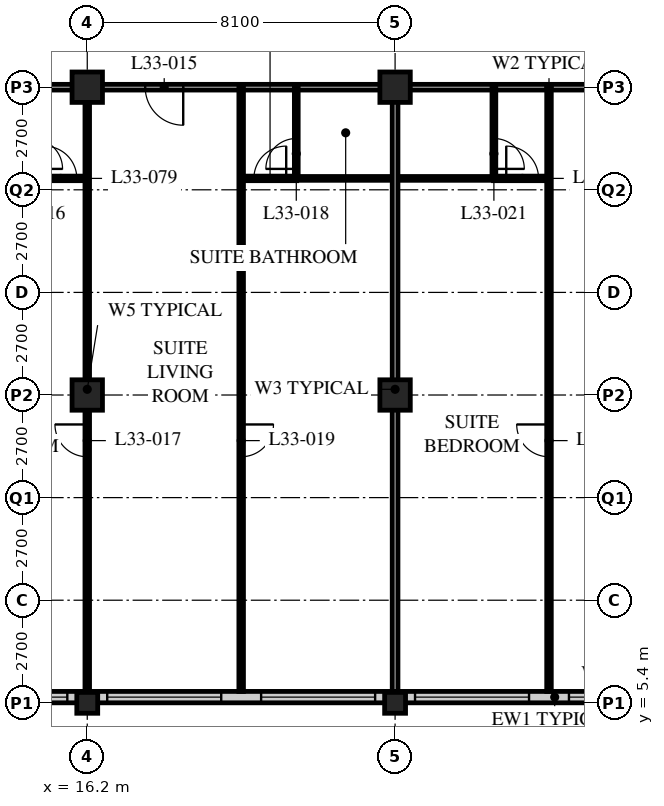
"""IFC4 building model, lengths in metres.
Left out: names, types, materials, properties, quantities, classifications, styles, units other than length and angle.
Written with IfcOpenShell. Run it as: python <this file> out.ifc"""

import sys

from ifc_helpers import new_model, si_unit, direction, frame, frame_2d, origin, origin_2d, place, context, subcontext, project, spatial, rectangle, hollow_rectangle, extrude, element, fill, save


model = new_model("IFC4")
c1 = context("Model", 3, precision=1e-05, world=origin(), true_north=direction((0.0, 1.0)))
c2 = subcontext(c1, "Body", "Model", "MODEL_VIEW")
j1 = project(units=[si_unit("LENGTHUNIT", "METRE"), si_unit("PLANEANGLEUNIT", "RADIAN")], contexts=[c1])
p1 = place(None, origin())
s1 = spatial("IfcSite", under=j1, at=p1, CompositionType="ELEMENT")
p2 = place(p1, origin())
s2 = spatial("IfcBuilding", under=s1, at=p2, CompositionType="ELEMENT")
p3 = place(p2, frame((0.0, 0.0, 130.6)))
s3 = spatial("IfcBuildingStorey", under=s2, at=p3, CompositionType="ELEMENT", Elevation=130.6)
p4 = place(p3, frame((16.2, 5.4, 0.0), z_axis=(0.0, 0.0, 1.0), x_axis=(1.0, 0.0, 0.0)))
e1 = element("IfcColumn", 1, at=p4, inside=s3, PredefinedType="COLUMN", context=c2, shape_type="SweptSolid", body=[
    extrude(hollow_rectangle(XDim=0.55, YDim=0.55, WallThickness=0.04, at=origin_2d()), origin(), (0.0, 0.0, 1.0), 3.4),
])
for number, where, z_axis, x_axis in (
    (2, (16.2, 13.5, 0.0), (0.0, 0.0, 1.0), (1.0, 0.0, 0.0)),
    (3, (16.2, 21.6, 0.0), (0.0, 0.0, 1.0), (1.0, 0.0, 0.0)),
):
    element("IfcColumn", number, at=place(p3, frame(where, z_axis=z_axis, x_axis=x_axis)), inside=s3, PredefinedType="COLUMN", context=c2, shape_type="SweptSolid", body=[
        extrude(hollow_rectangle(XDim=0.8, YDim=0.8, WallThickness=0.08, at=origin_2d()), origin(), (0.0, 0.0, 1.0), 3.4),
    ])
p5 = place(p3, frame((24.3, 5.4, 0.0), z_axis=(0.0, 0.0, 1.0), x_axis=(1.0, 0.0, 0.0)))
e4 = element("IfcColumn", 4, at=p5, inside=s3, PredefinedType="COLUMN", context=c2, shape_type="SweptSolid", body=[
    extrude(hollow_rectangle(XDim=0.55, YDim=0.55, WallThickness=0.04, at=origin_2d()), origin(), (0.0, 0.0, 1.0), 3.4),
])
for number, where, z_axis, x_axis in (
    (5, (24.3, 13.5, 0.0), (0.0, 0.0, 1.0), (1.0, 0.0, 0.0)),
    (6, (24.3, 21.6, 0.0), (0.0, 0.0, 1.0), (1.0, 0.0, 0.0)),
):
    element("IfcColumn", number, at=place(p3, frame(where, z_axis=z_axis, x_axis=x_axis)), inside=s3, PredefinedType="COLUMN", context=c2, shape_type="SweptSolid", body=[
        extrude(hollow_rectangle(XDim=0.8, YDim=0.8, WallThickness=0.08, at=origin_2d()), origin(), (0.0, 0.0, 1.0), 3.4),
    ])
p6 = place(p3, frame((8.4, 5.55, 0.0), z_axis=(0.0, 0.0, 1.0), x_axis=(1.0, 0.0, 0.0)))
e7 = element("IfcWall", 7, at=p6, inside=s3, PredefinedType="SOLIDWALL", context=c2, shape_type="SweptSolid", body=[
    extrude(rectangle(XDim=40.2, YDim=0.3, at=frame_2d((20.1, 0.0))), origin(), (0.0, 0.0, 1.0), 3.19),
])
p7 = place(p6, frame((0.225, 0.0, 0.9)))
e8 = element("IfcOpeningElement", 8, at=p7, cuts=e7, PredefinedType="OPENING", context=c2, shape_type="SweptSolid", body=[
    extrude(rectangle(XDim=3.0, YDim=2.0, at=frame_2d((1.5, 1.0))), frame((0.0, 0.16, 0.0), z_axis=(0.0, -1.0, 0.0), x_axis=(1.0, 0.0, 0.0)), (0.0, 0.0, 1.0), 0.32),
])
p8 = place(p6, frame((4.275, 0.0, 0.9)))
e9 = element("IfcOpeningElement", 9, at=p8, cuts=e7, PredefinedType="OPENING", context=c2, shape_type="SweptSolid", body=[
    extrude(rectangle(XDim=3.0, YDim=2.0, at=frame_2d((1.5, 1.0))), frame((0.0, 0.16, 0.0), z_axis=(0.0, -1.0, 0.0), x_axis=(1.0, 0.0, 0.0)), (0.0, 0.0, 1.0), 0.32),
])
p9 = place(p6, frame((8.325, 0.0, 0.9)))
e10 = element("IfcOpeningElement", 10, at=p9, cuts=e7, PredefinedType="OPENING", context=c2, shape_type="SweptSolid", body=[
    extrude(rectangle(XDim=3.0, YDim=2.0, at=frame_2d((1.5, 1.0))), frame((0.0, 0.16, 0.0), z_axis=(0.0, -1.0, 0.0), x_axis=(1.0, 0.0, 0.0)), (0.0, 0.0, 1.0), 0.32),
])
p10 = place(p6, frame((12.375, 0.0, 0.9)))
e11 = element("IfcOpeningElement", 11, at=p10, cuts=e7, PredefinedType="OPENING", context=c2, shape_type="SweptSolid", body=[
    extrude(rectangle(XDim=3.0, YDim=2.0, at=frame_2d((1.5, 1.0))), frame((0.0, 0.16, 0.0), z_axis=(0.0, -1.0, 0.0), x_axis=(1.0, 0.0, 0.0)), (0.0, 0.0, 1.0), 0.32),
])
p11 = place(p6, frame((16.425, 0.0, 0.9)))
e12 = element("IfcOpeningElement", 12, at=p11, cuts=e7, PredefinedType="OPENING", context=c2, shape_type="SweptSolid", body=[
    extrude(rectangle(XDim=3.0, YDim=2.0, at=frame_2d((1.5, 1.0))), frame((0.0, 0.16, 0.0), z_axis=(0.0, -1.0, 0.0), x_axis=(1.0, 0.0, 0.0)), (0.0, 0.0, 1.0), 0.32),
])
p12 = place(p6, frame((20.475, 0.0, 0.9)))
e13 = element("IfcOpeningElement", 13, at=p12, cuts=e7, PredefinedType="OPENING", context=c2, shape_type="SweptSolid", body=[
    extrude(rectangle(XDim=3.0, YDim=2.0, at=frame_2d((1.5, 1.0))), frame((0.0, 0.16, 0.0), z_axis=(0.0, -1.0, 0.0), x_axis=(1.0, 0.0, 0.0)), (0.0, 0.0, 1.0), 0.32),
])
p13 = place(p6, frame((24.525, 0.0, 0.9)))
e14 = element("IfcOpeningElement", 14, at=p13, cuts=e7, PredefinedType="OPENING", context=c2, shape_type="SweptSolid", body=[
    extrude(rectangle(XDim=3.0, YDim=2.0, at=frame_2d((1.5, 1.0))), frame((0.0, 0.16, 0.0), z_axis=(0.0, -1.0, 0.0), x_axis=(1.0, 0.0, 0.0)), (0.0, 0.0, 1.0), 0.32),
])
p14 = place(p6, frame((28.575, 0.0, 0.9)))
e15 = element("IfcOpeningElement", 15, at=p14, cuts=e7, PredefinedType="OPENING", context=c2, shape_type="SweptSolid", body=[
    extrude(rectangle(XDim=3.0, YDim=2.0, at=frame_2d((1.5, 1.0))), frame((0.0, 0.16, 0.0), z_axis=(0.0, -1.0, 0.0), x_axis=(1.0, 0.0, 0.0)), (0.0, 0.0, 1.0), 0.32),
])
p15 = place(p6, frame((32.625, 0.0, 0.9)))
e16 = element("IfcOpeningElement", 16, at=p15, cuts=e7, PredefinedType="OPENING", context=c2, shape_type="SweptSolid", body=[
    extrude(rectangle(XDim=3.0, YDim=2.0, at=frame_2d((1.5, 1.0))), frame((0.0, 0.16, 0.0), z_axis=(0.0, -1.0, 0.0), x_axis=(1.0, 0.0, 0.0)), (0.0, 0.0, 1.0), 0.32),
])
p16 = place(p6, frame((36.675, 0.0, 0.9)))
e17 = element("IfcOpeningElement", 17, at=p16, cuts=e7, PredefinedType="OPENING", context=c2, shape_type="SweptSolid", body=[
    extrude(rectangle(XDim=3.0, YDim=2.0, at=frame_2d((1.5, 1.0))), frame((0.0, 0.16, 0.0), z_axis=(0.0, -1.0, 0.0), x_axis=(1.0, 0.0, 0.0)), (0.0, 0.0, 1.0), 0.32),
])
p17 = place(p3, frame((8.1, 21.6, 0.0), z_axis=(0.0, 0.0, 1.0), x_axis=(1.0, 0.0, 0.0)))
e18 = element("IfcWall", 18, at=p17, inside=s3, PredefinedType="PARTITIONING", context=c2, shape_type="SweptSolid", body=[
    extrude(rectangle(XDim=40.5, YDim=0.15, at=frame_2d((20.25, 0.0))), origin(), (0.0, 0.0, 1.0), 2.578),
])
p18 = place(p17, frame((9.625, 0.0, 0.0)))
e19 = element("IfcOpeningElement", 19, at=p18, cuts=e18, PredefinedType="OPENING", context=c2, shape_type="SweptSolid", body=[
    extrude(rectangle(XDim=1.0, YDim=2.1, at=frame_2d((0.5, 1.05))), frame((0.0, 0.085, 0.0), z_axis=(0.0, -1.0, 0.0), x_axis=(1.0, 0.0, 0.0)), (0.0, 0.0, 1.0), 0.17),
])
p19 = place(p17, frame((21.775, 0.0, 0.0)))
e20 = element("IfcOpeningElement", 20, at=p19, cuts=e18, PredefinedType="OPENING", context=c2, shape_type="SweptSolid", body=[
    extrude(rectangle(XDim=1.0, YDim=2.1, at=frame_2d((0.5, 1.05))), frame((0.0, 0.085, 0.0), z_axis=(0.0, -1.0, 0.0), x_axis=(1.0, 0.0, 0.0)), (0.0, 0.0, 1.0), 0.17),
])
p20 = place(p17, frame((28.95, 0.0, 0.0)))
e21 = element("IfcOpeningElement", 21, at=p20, cuts=e18, PredefinedType="OPENING", context=c2, shape_type="SweptSolid", body=[
    extrude(rectangle(XDim=1.0, YDim=2.1, at=frame_2d((0.5, 1.05))), frame((0.0, 0.085, 0.0), z_axis=(0.0, -1.0, 0.0), x_axis=(1.0, 0.0, 0.0)), (0.0, 0.0, 1.0), 0.17),
])
p21 = place(p17, frame((34.85, 0.0, 0.0)))
e22 = element("IfcOpeningElement", 22, at=p21, cuts=e18, PredefinedType="OPENING", context=c2, shape_type="SweptSolid", body=[
    extrude(rectangle(XDim=1.0, YDim=2.1, at=frame_2d((0.5, 1.05))), frame((0.0, 0.085, 0.0), z_axis=(0.0, -1.0, 0.0), x_axis=(1.0, 0.0, 0.0)), (0.0, 0.0, 1.0), 0.17),
])
p22 = place(p17, frame((1.525, 0.0, 0.0)))
e23 = element("IfcOpeningElement", 23, at=p22, cuts=e18, PredefinedType="OPENING", context=c2, shape_type="SweptSolid", body=[
    extrude(rectangle(XDim=1.0, YDim=2.1, at=frame_2d((0.5, 1.05))), frame((0.0, 0.085, 0.0), z_axis=(0.0, -1.0, 0.0), x_axis=(1.0, 0.0, 0.0)), (0.0, 0.0, 1.0), 0.17),
])
p23 = place(p17, frame((37.975, 0.0, 0.0)))
e24 = element("IfcOpeningElement", 24, at=p23, cuts=e18, PredefinedType="OPENING", context=c2, shape_type="SweptSolid", body=[
    extrude(rectangle(XDim=1.0, YDim=2.1, at=frame_2d((0.5, 1.05))), frame((0.0, 0.085, 0.0), z_axis=(0.0, -1.0, 0.0), x_axis=(1.0, 0.0, 0.0)), (0.0, 0.0, 1.0), 0.17),
])
p24 = place(p3, frame((16.2, 21.6, 0.0), z_axis=(0.0, 0.0, 1.0), x_axis=(0.0, -1.0, 0.0)))
e25 = element("IfcWall", 25, at=p24, inside=s3, PredefinedType="PARTITIONING", context=c2, shape_type="SweptSolid", body=[
    extrude(rectangle(XDim=15.9, YDim=0.12, at=frame_2d((7.95, 0.0))), origin(), (0.0, 0.0, 1.0), 2.578),
])
p25 = place(p24, frame((8.875, 0.0, 0.0)))
e26 = element("IfcOpeningElement", 26, at=p25, cuts=e25, PredefinedType="OPENING", context=c2, shape_type="SweptSolid", body=[
    extrude(rectangle(XDim=0.85, YDim=2.1, at=frame_2d((0.425, 1.05))), frame((0.0, 0.07, 0.0), z_axis=(0.0, -1.0, 0.0), x_axis=(1.0, 0.0, 0.0)), (0.0, 0.0, 1.0), 0.14),
])
p26 = place(p3, frame((21.7, 19.2, 0.0), z_axis=(0.0, 0.0, 1.0), x_axis=(1.0, 0.0, 0.0)))
e27 = element("IfcWall", 27, at=p26, inside=s3, PredefinedType="PARTITIONING", context=c2, shape_type="SweptSolid", body=[
    extrude(rectangle(XDim=5.2, YDim=0.1, at=frame_2d((2.6, 0.0))), origin(), (0.0, 0.0, 1.0), 3.19),
])
p27 = place(p3, frame((21.7, 21.6, 0.0), z_axis=(0.0, 0.0, 1.0), x_axis=(0.0, -1.0, 0.0)))
e28 = element("IfcWall", 28, at=p27, inside=s3, PredefinedType="PARTITIONING", context=c2, shape_type="SweptSolid", body=[
    extrude(rectangle(XDim=2.4, YDim=0.1, at=frame_2d((1.2, 0.0))), origin(), (0.0, 0.0, 1.0), 3.19),
])
p28 = place(p27, frame((1.35, 0.0, 0.0)))
e29 = element("IfcOpeningElement", 29, at=p28, cuts=e28, PredefinedType="OPENING", context=c2, shape_type="SweptSolid", body=[
    extrude(rectangle(XDim=0.8, YDim=2.1, at=frame_2d((0.4, 1.05))), frame((0.0, 0.06, 0.0), z_axis=(0.0, -1.0, 0.0), x_axis=(1.0, 0.0, 0.0)), (0.0, 0.0, 1.0), 0.12),
])
p29 = place(p3, frame((20.25, 21.6, 0.0), z_axis=(0.0, 0.0, 1.0), x_axis=(0.0, -1.0, 0.0)))
e30 = element("IfcWall", 30, at=p29, inside=s3, PredefinedType="PARTITIONING", context=c2, shape_type="SweptSolid", body=[
    extrude(rectangle(XDim=15.9, YDim=0.12, at=frame_2d((7.95, 0.0))), origin(), (0.0, 0.0, 1.0), 3.19),
])
p30 = place(p29, frame((8.875, 0.0, 0.0)))
e31 = element("IfcOpeningElement", 31, at=p30, cuts=e30, PredefinedType="OPENING", context=c2, shape_type="SweptSolid", body=[
    extrude(rectangle(XDim=0.85, YDim=2.1, at=frame_2d((0.425, 1.05))), frame((0.0, 0.07, 0.0), z_axis=(0.0, -1.0, 0.0), x_axis=(1.0, 0.0, 0.0)), (0.0, 0.0, 1.0), 0.14),
])
p31 = place(p3, frame((24.3, 21.6, 0.0), z_axis=(0.0, 0.0, 1.0), x_axis=(0.0, -1.0, 0.0)))
e32 = element("IfcWall", 32, at=p31, inside=s3, PredefinedType="PARTITIONING", context=c2, shape_type="SweptSolid", body=[
    extrude(rectangle(XDim=15.9, YDim=0.15, at=frame_2d((7.95, 0.0))), origin(), (0.0, 0.0, 1.0), 2.578),
])
p32 = place(p3, frame((26.9, 21.6, 0.0), z_axis=(0.0, 0.0, 1.0), x_axis=(0.0, -1.0, 0.0)))
e33 = element("IfcWall", 33, at=p32, inside=s3, PredefinedType="PARTITIONING", context=c2, shape_type="SweptSolid", body=[
    extrude(rectangle(XDim=2.4, YDim=0.1, at=frame_2d((1.2, 0.0))), origin(), (0.0, 0.0, 1.0), 3.19),
])
p33 = place(p32, frame((1.35, 0.0, 0.0)))
e34 = element("IfcOpeningElement", 34, at=p33, cuts=e33, PredefinedType="OPENING", context=c2, shape_type="SweptSolid", body=[
    extrude(rectangle(XDim=0.8, YDim=2.1, at=frame_2d((0.4, 1.05))), frame((0.0, 0.06, 0.0), z_axis=(0.0, -1.0, 0.0), x_axis=(1.0, 0.0, 0.0)), (0.0, 0.0, 1.0), 0.12),
])
p34 = place(p3, frame((28.35, 21.6, 0.0), z_axis=(0.0, 0.0, 1.0), x_axis=(0.0, -1.0, 0.0)))
e35 = element("IfcWall", 35, at=p34, inside=s3, PredefinedType="PARTITIONING", context=c2, shape_type="SweptSolid", body=[
    extrude(rectangle(XDim=15.9, YDim=0.12, at=frame_2d((7.95, 0.0))), origin(), (0.0, 0.0, 1.0), 3.19),
])
p35 = place(p34, frame((8.875, 0.0, 0.0)))
e36 = element("IfcOpeningElement", 36, at=p35, cuts=e35, PredefinedType="OPENING", context=c2, shape_type="SweptSolid", body=[
    extrude(rectangle(XDim=0.85, YDim=2.1, at=frame_2d((0.425, 1.05))), frame((0.0, 0.07, 0.0), z_axis=(0.0, -1.0, 0.0), x_axis=(1.0, 0.0, 0.0)), (0.0, 0.0, 1.0), 0.14),
])
p36 = place(p3, frame((16.2, 19.2, 0.0), z_axis=(0.0, 0.0, 1.0), x_axis=(-1.0, 0.0, 0.0)))
e37 = element("IfcWall", 37, at=p36, inside=s3, PredefinedType="PARTITIONING", context=c2, shape_type="SweptSolid", body=[
    extrude(rectangle(XDim=1.46, YDim=0.12, at=frame_2d((0.73, 0.0))), origin(), (0.0, 0.0, 1.0), 3.19),
])
p37 = place(p36, frame((0.275, 0.0, 0.0)))
e38 = element("IfcOpeningElement", 38, at=p37, cuts=e37, PredefinedType="OPENING", context=c2, shape_type="SweptSolid", body=[
    extrude(rectangle(XDim=0.85, YDim=2.1, at=frame_2d((0.425, 1.05))), frame((0.0, 0.07, 0.0), z_axis=(0.0, -1.0, 0.0), x_axis=(1.0, 0.0, 0.0)), (0.0, 0.0, 1.0), 0.14),
])
p38 = place(p3, frame((21.71, 19.2, 0.0), z_axis=(0.0, 0.0, 1.0), x_axis=(-1.0, 0.0, 0.0)))
e39 = element("IfcWall", 39, at=p38, inside=s3, PredefinedType="PARTITIONING", context=c2, shape_type="SweptSolid", body=[
    extrude(rectangle(XDim=1.46, YDim=0.12, at=frame_2d((0.73, 0.0))), origin(), (0.0, 0.0, 1.0), 3.19),
])
p39 = place(p38, frame((0.275, 0.0, 0.0)))
e40 = element("IfcOpeningElement", 40, at=p39, cuts=e39, PredefinedType="OPENING", context=c2, shape_type="SweptSolid", body=[
    extrude(rectangle(XDim=0.85, YDim=2.1, at=frame_2d((0.425, 1.05))), frame((0.0, 0.07, 0.0), z_axis=(0.0, -1.0, 0.0), x_axis=(1.0, 0.0, 0.0)), (0.0, 0.0, 1.0), 0.14),
])
p40 = place(p3, frame((28.35, 19.2, 0.0), z_axis=(0.0, 0.0, 1.0), x_axis=(-1.0, 0.0, 0.0)))
e41 = element("IfcWall", 41, at=p40, inside=s3, PredefinedType="PARTITIONING", context=c2, shape_type="SweptSolid", body=[
    extrude(rectangle(XDim=1.46, YDim=0.12, at=frame_2d((0.73, 0.0))), origin(), (0.0, 0.0, 1.0), 3.19),
])
p41 = place(p40, frame((0.275, 0.0, 0.0)))
e42 = element("IfcOpeningElement", 42, at=p41, cuts=e41, PredefinedType="OPENING", context=c2, shape_type="SweptSolid", body=[
    extrude(rectangle(XDim=0.85, YDim=2.1, at=frame_2d((0.425, 1.05))), frame((0.0, 0.07, 0.0), z_axis=(0.0, -1.0, 0.0), x_axis=(1.0, 0.0, 0.0)), (0.0, 0.0, 1.0), 0.14),
])
p42 = place(p8, origin())
e43 = element("IfcWindow", 43, at=p42, inside=s3, PartitioningType="SINGLE_PANEL", PredefinedType="WINDOW", context=c2, shape_type="SweptSolid", body=[
    extrude(rectangle(XDim=3.0, YDim=2.0, at=frame_2d((1.5, 1.0))), frame((0.0, 0.03, 0.0), z_axis=(0.0, -1.0, 0.0), x_axis=(1.0, 0.0, 0.0)), (0.0, 0.0, 1.0), 0.06),
])
fill(e9, e43)
p43 = place(p9, origin())
e44 = element("IfcWindow", 44, at=p43, inside=s3, PartitioningType="SINGLE_PANEL", PredefinedType="WINDOW", context=c2, shape_type="SweptSolid", body=[
    extrude(rectangle(XDim=3.0, YDim=2.0, at=frame_2d((1.5, 1.0))), frame((0.0, 0.03, 0.0), z_axis=(0.0, -1.0, 0.0), x_axis=(1.0, 0.0, 0.0)), (0.0, 0.0, 1.0), 0.06),
])
fill(e10, e44)
p44 = place(p10, origin())
e45 = element("IfcWindow", 45, at=p44, inside=s3, PartitioningType="SINGLE_PANEL", PredefinedType="WINDOW", context=c2, shape_type="SweptSolid", body=[
    extrude(rectangle(XDim=3.0, YDim=2.0, at=frame_2d((1.5, 1.0))), frame((0.0, 0.03, 0.0), z_axis=(0.0, -1.0, 0.0), x_axis=(1.0, 0.0, 0.0)), (0.0, 0.0, 1.0), 0.06),
])
fill(e11, e45)
p45 = place(p11, origin())
e46 = element("IfcWindow", 46, at=p45, inside=s3, PartitioningType="SINGLE_PANEL", PredefinedType="WINDOW", context=c2, shape_type="SweptSolid", body=[
    extrude(rectangle(XDim=3.0, YDim=2.0, at=frame_2d((1.5, 1.0))), frame((0.0, 0.03, 0.0), z_axis=(0.0, -1.0, 0.0), x_axis=(1.0, 0.0, 0.0)), (0.0, 0.0, 1.0), 0.06),
])
fill(e12, e46)
p46 = place(p12, origin())
e47 = element("IfcWindow", 47, at=p46, inside=s3, PartitioningType="SINGLE_PANEL", PredefinedType="WINDOW", context=c2, shape_type="SweptSolid", body=[
    extrude(rectangle(XDim=3.0, YDim=2.0, at=frame_2d((1.5, 1.0))), frame((0.0, 0.03, 0.0), z_axis=(0.0, -1.0, 0.0), x_axis=(1.0, 0.0, 0.0)), (0.0, 0.0, 1.0), 0.06),
])
fill(e13, e47)
p47 = place(p18, origin())
e48 = element("IfcDoor", 48, at=p47, inside=s3, OperationType="SINGLE_SWING_LEFT", PredefinedType="DOOR", context=c2, shape_type="SweptSolid", body=[
    extrude(rectangle(XDim=1.0, YDim=2.1, at=frame_2d((0.5, 1.05))), frame((0.0, 0.025, 0.0), z_axis=(0.0, -1.0, 0.0), x_axis=(1.0, 0.0, 0.0)), (0.0, 0.0, 1.0), 0.05),
])
fill(e19, e48)
p48 = place(p25, origin())
e49 = element("IfcDoor", 49, at=p48, inside=s3, OperationType="SINGLE_SWING_RIGHT", PredefinedType="DOOR", context=c2, shape_type="SweptSolid", body=[
    extrude(rectangle(XDim=0.85, YDim=2.1, at=frame_2d((0.425, 1.05))), frame((0.0, 0.025, 0.0), z_axis=(0.0, -1.0, 0.0), x_axis=(1.0, 0.0, 0.0)), (0.0, 0.0, 1.0), 0.05),
])
fill(e26, e49)
p49 = place(p28, origin())
e50 = element("IfcDoor", 50, at=p49, inside=s3, OperationType="SINGLE_SWING_LEFT", PredefinedType="DOOR", context=c2, shape_type="SweptSolid", body=[
    extrude(rectangle(XDim=0.8, YDim=2.1, at=frame_2d((0.4, 1.05))), frame((0.0, 0.025, 0.0), z_axis=(0.0, -1.0, 0.0), x_axis=(1.0, 0.0, 0.0)), (0.0, 0.0, 1.0), 0.05),
])
fill(e29, e50)
p50 = place(p30, origin())
e51 = element("IfcDoor", 51, at=p50, inside=s3, OperationType="SINGLE_SWING_LEFT", PredefinedType="DOOR", context=c2, shape_type="SweptSolid", body=[
    extrude(rectangle(XDim=0.85, YDim=2.1, at=frame_2d((0.425, 1.05))), frame((0.0, 0.025, 0.0), z_axis=(0.0, -1.0, 0.0), x_axis=(1.0, 0.0, 0.0)), (0.0, 0.0, 1.0), 0.05),
])
fill(e31, e51)
p51 = place(p33, origin())
e52 = element("IfcDoor", 52, at=p51, inside=s3, OperationType="SINGLE_SWING_RIGHT", PredefinedType="DOOR", context=c2, shape_type="SweptSolid", body=[
    extrude(rectangle(XDim=0.8, YDim=2.1, at=frame_2d((0.4, 1.05))), frame((0.0, 0.025, 0.0), z_axis=(0.0, -1.0, 0.0), x_axis=(1.0, 0.0, 0.0)), (0.0, 0.0, 1.0), 0.05),
])
fill(e34, e52)
p52 = place(p35, origin())
e53 = element("IfcDoor", 53, at=p52, inside=s3, OperationType="SINGLE_SWING_RIGHT", PredefinedType="DOOR", context=c2, shape_type="SweptSolid", body=[
    extrude(rectangle(XDim=0.85, YDim=2.1, at=frame_2d((0.425, 1.05))), frame((0.0, 0.025, 0.0), z_axis=(0.0, -1.0, 0.0), x_axis=(1.0, 0.0, 0.0)), (0.0, 0.0, 1.0), 0.05),
])
fill(e36, e53)
p53 = place(p37, origin())
e54 = element("IfcDoor", 54, at=p53, inside=s3, OperationType="SINGLE_SWING_LEFT", PredefinedType="DOOR", context=c2, shape_type="SweptSolid", body=[
    extrude(rectangle(XDim=0.85, YDim=2.1, at=frame_2d((0.425, 1.05))), frame((0.0, 0.025, 0.0), z_axis=(0.0, -1.0, 0.0), x_axis=(1.0, 0.0, 0.0)), (0.0, 0.0, 1.0), 0.05),
])
fill(e38, e54)
p54 = place(p39, origin())
e55 = element("IfcDoor", 55, at=p54, inside=s3, OperationType="SINGLE_SWING_RIGHT", PredefinedType="DOOR", context=c2, shape_type="SweptSolid", body=[
    extrude(rectangle(XDim=0.85, YDim=2.1, at=frame_2d((0.425, 1.05))), frame((0.0, 0.025, 0.0), z_axis=(0.0, -1.0, 0.0), x_axis=(1.0, 0.0, 0.0)), (0.0, 0.0, 1.0), 0.05),
])
fill(e40, e55)
p55 = place(p41, origin())
e56 = element("IfcDoor", 56, at=p55, inside=s3, OperationType="SINGLE_SWING_LEFT", PredefinedType="DOOR", context=c2, shape_type="SweptSolid", body=[
    extrude(rectangle(XDim=0.85, YDim=2.1, at=frame_2d((0.425, 1.05))), frame((0.0, 0.025, 0.0), z_axis=(0.0, -1.0, 0.0), x_axis=(1.0, 0.0, 0.0)), (0.0, 0.0, 1.0), 0.05),
])
fill(e42, e56)
save(model, sys.argv[1])
